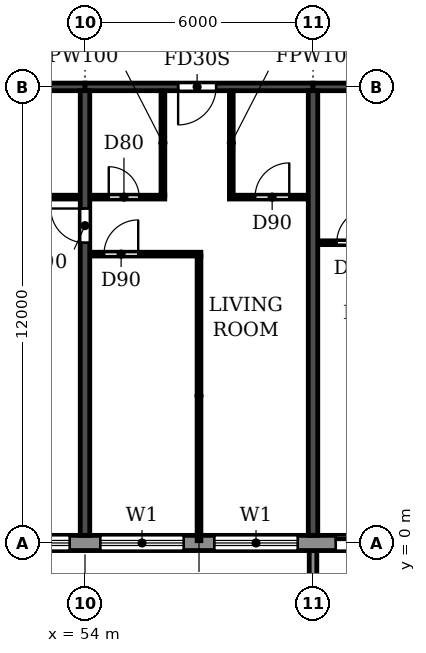
"""IFC4 building model, lengths in metres.
Left out: names, types, materials, properties, quantities, classifications, styles, units other than length and angle.
Written with IfcOpenShell. Run it as: python <this file> out.ifc"""

import sys

from ifc_helpers import new_model, si_unit, direction, frame, frame_2d, origin, place, context, subcontext, project, spatial, polyline, rectangle, outline, extrude, source, transform, mapped, element, fill, save


model = new_model("IFC4")
c1 = context("Model", 3, precision=1e-05, world=origin(), true_north=direction((0.0, 1.0)))
c2 = subcontext(c1, "Body", "Model", "MODEL_VIEW")
j1 = project(units=[si_unit("LENGTHUNIT", "METRE"), si_unit("PLANEANGLEUNIT", "RADIAN")], contexts=[c1])
p1 = place(None, origin())
s1 = spatial("IfcSite", under=j1, at=p1, CompositionType="ELEMENT")
p2 = place(p1, origin())
s2 = spatial("IfcBuilding", under=s1, at=p2, CompositionType="ELEMENT")
p3 = place(p2, frame((0.0, 0.0, 181.8)))
s3 = spatial("IfcBuildingStorey", under=s2, at=p3, CompositionType="ELEMENT", Elevation=181.8)
p4 = place(p3, frame((54.0, 0.2, 0.0), z_axis=(0.0, 0.0, 1.0), x_axis=(0.0, 1.0, 0.0)))
e1 = element("IfcWall", 1, at=p4, inside=s3, PredefinedType="SHEAR", context=c2, shape_type="SweptSolid", body=[
    extrude(rectangle(XDim=11.7, YDim=0.25, at=frame_2d((5.85, 0.0))), origin(), (0.0, 0.0, 1.0), 3.08),
])
p5 = place(p4, frame((7.7, 0.0, 0.0)))
e2 = element("IfcOpeningElement", 2, at=p5, cuts=e1, PredefinedType="OPENING", context=c2, shape_type="SweptSolid", body=[
    extrude(rectangle(XDim=0.9, YDim=2.1, at=frame_2d((0.45, 1.05))), frame((0.0, 0.135, 0.0), z_axis=(0.0, -1.0, 0.0), x_axis=(1.0, 0.0, 0.0)), (0.0, 0.0, 1.0), 0.27),
])
p6 = place(p3, frame((60.0, 0.2, 0.0), z_axis=(0.0, 0.0, 1.0), x_axis=(0.0, 1.0, 0.0)))
e3 = element("IfcWall", 3, at=p6, inside=s3, PredefinedType="SHEAR", context=c2, shape_type="SweptSolid", body=[
    extrude(rectangle(XDim=11.7, YDim=0.25, at=frame_2d((5.85, 0.0))), origin(), (0.0, 0.0, 1.0), 3.08),
])
p7 = place(p3, frame((48.0, 12.0, 0.0), z_axis=(0.0, 0.0, 1.0), x_axis=(1.0, 0.0, 0.0)))
e4 = element("IfcWall", 4, at=p7, inside=s3, PredefinedType="SHEAR", context=c2, shape_type="SweptSolid", body=[
    extrude(rectangle(XDim=6.0, YDim=0.2, at=frame_2d((3.0, 0.0))), origin(), (0.0, 0.0, 1.0), 2.48),
])
p8 = place(p3, frame((54.0, 12.0, 0.0), z_axis=(0.0, 0.0, 1.0), x_axis=(1.0, 0.0, 0.0)))
e5 = element("IfcWall", 5, at=p8, inside=s3, PredefinedType="SHEAR", context=c2, shape_type="SweptSolid", body=[
    extrude(rectangle(XDim=6.0, YDim=0.2, at=frame_2d((3.0, 0.0))), origin(), (0.0, 0.0, 1.0), 2.48),
])
p9 = place(p8, frame((2.45, 0.0, 0.0)))
e6 = element("IfcOpeningElement", 6, at=p9, cuts=e5, PredefinedType="OPENING", context=c2, shape_type="SweptSolid", body=[
    extrude(rectangle(XDim=1.0, YDim=2.1, at=frame_2d((0.5, 1.05))), frame((0.0, 0.11, 0.0), z_axis=(0.0, -1.0, 0.0), x_axis=(1.0, 0.0, 0.0)), (0.0, 0.0, 1.0), 0.22),
])
p10 = place(p3, frame((60.0, 12.0, 0.0), z_axis=(0.0, 0.0, 1.0), x_axis=(1.0, 0.0, 0.0)))
e7 = element("IfcWall", 7, at=p10, inside=s3, PredefinedType="SHEAR", context=c2, shape_type="SweptSolid", body=[
    extrude(rectangle(XDim=6.0, YDim=0.2, at=frame_2d((3.0, 0.0))), origin(), (0.0, 0.0, 1.0), 2.48),
])
p11 = place(p10, frame((2.55, 0.0, 0.0)))
e8 = element("IfcOpeningElement", 8, at=p11, cuts=e7, PredefinedType="OPENING", context=c2, shape_type="SweptSolid", body=[
    extrude(rectangle(XDim=1.0, YDim=2.1, at=frame_2d((0.5, 1.05))), frame((0.0, 0.11, 0.0), z_axis=(0.0, -1.0, 0.0), x_axis=(1.0, 0.0, 0.0)), (0.0, 0.0, 1.0), 0.22),
])
p12 = place(p3, frame((22.683, 0.0, 0.0), z_axis=(0.0, 0.0, 1.0), x_axis=(1.0, 0.0, 0.0)))
e9 = element("IfcWall", 9, at=p12, inside=s3, PredefinedType="STANDARD", context=c2, shape_type="SweptSolid", body=[
    extrude(rectangle(XDim=56.634, YDim=0.4, at=frame_2d((28.317, 0.0))), origin(), (0.0, 0.0, 1.0), 3.08),
])
p13 = place(p12, frame((1.717, 0.0, 0.9)))
e10 = element("IfcOpeningElement", 10, at=p13, cuts=e9, PredefinedType="OPENING", context=c2, shape_type="SweptSolid", body=[
    extrude(rectangle(XDim=2.2, YDim=1.5, at=frame_2d((1.1, 0.75))), frame((0.0, 0.21, 0.0), z_axis=(0.0, -1.0, 0.0), x_axis=(1.0, 0.0, 0.0)), (0.0, 0.0, 1.0), 0.42),
])
p14 = place(p12, frame((4.917, 0.0, 0.0)))
e11 = element("IfcOpeningElement", 11, at=p14, cuts=e9, PredefinedType="OPENING", context=c2, shape_type="SweptSolid", body=[
    extrude(rectangle(XDim=1.8, YDim=2.4, at=frame_2d((0.9, 1.2))), frame((0.0, 0.21, 0.0), z_axis=(0.0, -1.0, 0.0), x_axis=(1.0, 0.0, 0.0)), (0.0, 0.0, 1.0), 0.42),
])
p15 = place(p12, frame((7.717, 0.0, 0.9)))
e12 = element("IfcOpeningElement", 12, at=p15, cuts=e9, PredefinedType="OPENING", context=c2, shape_type="SweptSolid", body=[
    extrude(rectangle(XDim=2.2, YDim=1.5, at=frame_2d((1.1, 0.75))), frame((0.0, 0.21, 0.0), z_axis=(0.0, -1.0, 0.0), x_axis=(1.0, 0.0, 0.0)), (0.0, 0.0, 1.0), 0.42),
])
p16 = place(p12, frame((10.717, 0.0, 0.9)))
e13 = element("IfcOpeningElement", 13, at=p16, cuts=e9, PredefinedType="OPENING", context=c2, shape_type="SweptSolid", body=[
    extrude(rectangle(XDim=2.2, YDim=1.5, at=frame_2d((1.1, 0.75))), frame((0.0, 0.21, 0.0), z_axis=(0.0, -1.0, 0.0), x_axis=(1.0, 0.0, 0.0)), (0.0, 0.0, 1.0), 0.42),
])
p17 = place(p12, frame((13.717, 0.0, 0.9)))
e14 = element("IfcOpeningElement", 14, at=p17, cuts=e9, PredefinedType="OPENING", context=c2, shape_type="SweptSolid", body=[
    extrude(rectangle(XDim=2.2, YDim=1.5, at=frame_2d((1.1, 0.75))), frame((0.0, 0.21, 0.0), z_axis=(0.0, -1.0, 0.0), x_axis=(1.0, 0.0, 0.0)), (0.0, 0.0, 1.0), 0.42),
])
p18 = place(p12, frame((16.717, 0.0, 0.9)))
e15 = element("IfcOpeningElement", 15, at=p18, cuts=e9, PredefinedType="OPENING", context=c2, shape_type="SweptSolid", body=[
    extrude(rectangle(XDim=2.2, YDim=1.5, at=frame_2d((1.1, 0.75))), frame((0.0, 0.21, 0.0), z_axis=(0.0, -1.0, 0.0), x_axis=(1.0, 0.0, 0.0)), (0.0, 0.0, 1.0), 0.42),
])
p19 = place(p12, frame((19.717, 0.0, 0.9)))
e16 = element("IfcOpeningElement", 16, at=p19, cuts=e9, PredefinedType="OPENING", context=c2, shape_type="SweptSolid", body=[
    extrude(rectangle(XDim=2.2, YDim=1.5, at=frame_2d((1.1, 0.75))), frame((0.0, 0.21, 0.0), z_axis=(0.0, -1.0, 0.0), x_axis=(1.0, 0.0, 0.0)), (0.0, 0.0, 1.0), 0.42),
])
p20 = place(p12, frame((22.717, 0.0, 0.9)))
e17 = element("IfcOpeningElement", 17, at=p20, cuts=e9, PredefinedType="OPENING", context=c2, shape_type="SweptSolid", body=[
    extrude(rectangle(XDim=2.2, YDim=1.5, at=frame_2d((1.1, 0.75))), frame((0.0, 0.21, 0.0), z_axis=(0.0, -1.0, 0.0), x_axis=(1.0, 0.0, 0.0)), (0.0, 0.0, 1.0), 0.42),
])
p21 = place(p12, frame((25.717, 0.0, 0.9)))
e18 = element("IfcOpeningElement", 18, at=p21, cuts=e9, PredefinedType="OPENING", context=c2, shape_type="SweptSolid", body=[
    extrude(rectangle(XDim=2.2, YDim=1.5, at=frame_2d((1.1, 0.75))), frame((0.0, 0.21, 0.0), z_axis=(0.0, -1.0, 0.0), x_axis=(1.0, 0.0, 0.0)), (0.0, 0.0, 1.0), 0.42),
])
p22 = place(p12, frame((28.717, 0.0, 0.9)))
e19 = element("IfcOpeningElement", 19, at=p22, cuts=e9, PredefinedType="OPENING", context=c2, shape_type="SweptSolid", body=[
    extrude(rectangle(XDim=2.2, YDim=1.5, at=frame_2d((1.1, 0.75))), frame((0.0, 0.21, 0.0), z_axis=(0.0, -1.0, 0.0), x_axis=(1.0, 0.0, 0.0)), (0.0, 0.0, 1.0), 0.42),
])
p23 = place(p12, frame((31.717, 0.0, 0.9)))
e20 = element("IfcOpeningElement", 20, at=p23, cuts=e9, PredefinedType="OPENING", context=c2, shape_type="SweptSolid", body=[
    extrude(rectangle(XDim=2.2, YDim=1.5, at=frame_2d((1.1, 0.75))), frame((0.0, 0.21, 0.0), z_axis=(0.0, -1.0, 0.0), x_axis=(1.0, 0.0, 0.0)), (0.0, 0.0, 1.0), 0.42),
])
p24 = place(p12, frame((34.717, 0.0, 0.9)))
e21 = element("IfcOpeningElement", 21, at=p24, cuts=e9, PredefinedType="OPENING", context=c2, shape_type="SweptSolid", body=[
    extrude(rectangle(XDim=2.2, YDim=1.5, at=frame_2d((1.1, 0.75))), frame((0.0, 0.21, 0.0), z_axis=(0.0, -1.0, 0.0), x_axis=(1.0, 0.0, 0.0)), (0.0, 0.0, 1.0), 0.42),
])
p25 = place(p12, frame((37.917, 0.0, 0.0)))
e22 = element("IfcOpeningElement", 22, at=p25, cuts=e9, PredefinedType="OPENING", context=c2, shape_type="SweptSolid", body=[
    extrude(rectangle(XDim=1.8, YDim=2.4, at=frame_2d((0.9, 1.2))), frame((0.0, 0.21, 0.0), z_axis=(0.0, -1.0, 0.0), x_axis=(1.0, 0.0, 0.0)), (0.0, 0.0, 1.0), 0.42),
])
p26 = place(p12, frame((40.717, 0.0, 0.9)))
e23 = element("IfcOpeningElement", 23, at=p26, cuts=e9, PredefinedType="OPENING", context=c2, shape_type="SweptSolid", body=[
    extrude(rectangle(XDim=2.2, YDim=1.5, at=frame_2d((1.1, 0.75))), frame((0.0, 0.21, 0.0), z_axis=(0.0, -1.0, 0.0), x_axis=(1.0, 0.0, 0.0)), (0.0, 0.0, 1.0), 0.42),
])
p27 = place(p12, frame((43.717, 0.0, 0.9)))
e24 = element("IfcOpeningElement", 24, at=p27, cuts=e9, PredefinedType="OPENING", context=c2, shape_type="SweptSolid", body=[
    extrude(rectangle(XDim=2.2, YDim=1.5, at=frame_2d((1.1, 0.75))), frame((0.0, 0.21, 0.0), z_axis=(0.0, -1.0, 0.0), x_axis=(1.0, 0.0, 0.0)), (0.0, 0.0, 1.0), 0.42),
])
p28 = place(p12, frame((46.717, 0.0, 0.9)))
e25 = element("IfcOpeningElement", 25, at=p28, cuts=e9, PredefinedType="OPENING", context=c2, shape_type="SweptSolid", body=[
    extrude(rectangle(XDim=2.2, YDim=1.5, at=frame_2d((1.1, 0.75))), frame((0.0, 0.21, 0.0), z_axis=(0.0, -1.0, 0.0), x_axis=(1.0, 0.0, 0.0)), (0.0, 0.0, 1.0), 0.42),
])
p29 = place(p12, frame((49.917, 0.0, 0.0)))
e26 = element("IfcOpeningElement", 26, at=p29, cuts=e9, PredefinedType="OPENING", context=c2, shape_type="SweptSolid", body=[
    extrude(rectangle(XDim=1.8, YDim=2.4, at=frame_2d((0.9, 1.2))), frame((0.0, 0.21, 0.0), z_axis=(0.0, -1.0, 0.0), x_axis=(1.0, 0.0, 0.0)), (0.0, 0.0, 1.0), 0.42),
])
p30 = place(p12, frame((52.717, 0.0, 0.9)))
e27 = element("IfcOpeningElement", 27, at=p30, cuts=e9, PredefinedType="OPENING", context=c2, shape_type="SweptSolid", body=[
    extrude(rectangle(XDim=2.2, YDim=1.5, at=frame_2d((1.1, 0.75))), frame((0.0, 0.21, 0.0), z_axis=(0.0, -1.0, 0.0), x_axis=(1.0, 0.0, 0.0)), (0.0, 0.0, 1.0), 0.42),
])
m1 = source(origin(), c2, "Body", "SweptSolid", [
    extrude(outline(polyline([(0.0, 0.0), (0.2, 0.0), (0.2, 1.65), (0.0, 1.65), (0.0, 0.0)])), origin(), (0.0, 0.0, 1.0), 3.1),
])
p31 = place(p3, frame((59.9, -1.85, 0.0)))
e28 = element("IfcWall", 28, at=p31, inside=s3, PredefinedType="STANDARD", context=c2, shape_type="MappedRepresentation", body=[
    mapped(m1, transform((0.0, 0.0, 0.0))),
])
p32 = place(p3, frame((54.135, 7.6, 0.0), z_axis=(0.0, 0.0, 1.0), x_axis=(1.0, 0.0, 0.0)))
e29 = element("IfcWall", 29, at=p32, inside=s3, PredefinedType="PARTITIONING", context=c2, shape_type="SweptSolid", body=[
    extrude(rectangle(XDim=2.915, YDim=0.1, at=frame_2d((1.458, 0.0))), origin(), (0.0, 0.0, 1.0), 3.08),
])
p33 = place(p32, frame((0.365, 0.0, 0.0)))
e30 = element("IfcOpeningElement", 30, at=p33, cuts=e29, PredefinedType="OPENING", context=c2, shape_type="SweptSolid", body=[
    extrude(rectangle(XDim=0.9, YDim=2.1, at=frame_2d((0.45, 1.05))), frame((0.0, 0.06, 0.0), z_axis=(0.0, -1.0, 0.0), x_axis=(1.0, 0.0, 0.0)), (0.0, 0.0, 1.0), 0.12),
])
p34 = place(p3, frame((60.135, 7.9, 0.0), z_axis=(0.0, 0.0, 1.0), x_axis=(1.0, 0.0, 0.0)))
e31 = element("IfcWall", 31, at=p34, inside=s3, PredefinedType="PARTITIONING", context=c2, shape_type="SweptSolid", body=[
    extrude(rectangle(XDim=2.065, YDim=0.1, at=frame_2d((1.032, 0.0))), origin(), (0.0, 0.0, 1.0), 3.08),
])
p35 = place(p34, frame((0.49, 0.0, 0.0)))
e32 = element("IfcOpeningElement", 32, at=p35, cuts=e31, PredefinedType="OPENING", context=c2, shape_type="SweptSolid", body=[
    extrude(rectangle(XDim=0.9, YDim=2.1, at=frame_2d((0.45, 1.05))), frame((0.0, 0.06, 0.0), z_axis=(0.0, -1.0, 0.0), x_axis=(1.0, 0.0, 0.0)), (0.0, 0.0, 1.0), 0.12),
])
p36 = place(p3, frame((51.1, 9.1, 0.0), z_axis=(0.0, 0.0, 1.0), x_axis=(1.0, 0.0, 0.0)))
e33 = element("IfcWall", 33, at=p36, inside=s3, PredefinedType="PARTITIONING", context=c2, shape_type="SweptSolid", body=[
    extrude(rectangle(XDim=2.765, YDim=0.1, at=frame_2d((1.382, 0.0))), origin(), (0.0, 0.0, 1.0), 3.08),
])
p37 = place(p36, frame((1.0, 0.0, 0.0)))
e34 = element("IfcOpeningElement", 34, at=p37, cuts=e33, PredefinedType="OPENING", context=c2, shape_type="SweptSolid", body=[
    extrude(rectangle(XDim=0.8, YDim=2.1, at=frame_2d((0.4, 1.05))), frame((0.0, 0.06, 0.0), z_axis=(0.0, -1.0, 0.0), x_axis=(1.0, 0.0, 0.0)), (0.0, 0.0, 1.0), 0.12),
])
p38 = place(p3, frame((54.135, 9.1, 0.0), z_axis=(0.0, 0.0, 1.0), x_axis=(1.0, 0.0, 0.0)))
e35 = element("IfcWall", 35, at=p38, inside=s3, PredefinedType="PARTITIONING", context=c2, shape_type="SweptSolid", body=[
    extrude(rectangle(XDim=1.965, YDim=0.1, at=frame_2d((0.982, 0.0))), origin(), (0.0, 0.0, 1.0), 3.08),
])
p39 = place(p38, frame((0.49, 0.0, 0.0)))
e36 = element("IfcOpeningElement", 36, at=p39, cuts=e35, PredefinedType="OPENING", context=c2, shape_type="SweptSolid", body=[
    extrude(rectangle(XDim=0.8, YDim=2.1, at=frame_2d((0.4, 1.05))), frame((0.0, 0.06, 0.0), z_axis=(0.0, -1.0, 0.0), x_axis=(1.0, 0.0, 0.0)), (0.0, 0.0, 1.0), 0.12),
])
p40 = place(p3, frame((57.8, 9.1, 0.0), z_axis=(0.0, 0.0, 1.0), x_axis=(1.0, 0.0, 0.0)))
e37 = element("IfcWall", 37, at=p40, inside=s3, PredefinedType="PARTITIONING", context=c2, shape_type="SweptSolid", body=[
    extrude(rectangle(XDim=2.065, YDim=0.1, at=frame_2d((1.032, 0.0))), origin(), (0.0, 0.0, 1.0), 3.08),
])
p41 = place(p40, frame((0.675, 0.0, 0.0)))
e38 = element("IfcOpeningElement", 38, at=p41, cuts=e37, PredefinedType="OPENING", context=c2, shape_type="SweptSolid", body=[
    extrude(rectangle(XDim=0.9, YDim=2.1, at=frame_2d((0.45, 1.05))), frame((0.0, 0.06, 0.0), z_axis=(0.0, -1.0, 0.0), x_axis=(1.0, 0.0, 0.0)), (0.0, 0.0, 1.0), 0.12),
])
p42 = place(p3, frame((56.05, 9.15, 0.0), z_axis=(0.0, 0.0, 1.0), x_axis=(0.0, 1.0, 0.0)))
e39 = element("IfcWall", 39, at=p42, inside=s3, PredefinedType="PARTITIONING", context=c2, shape_type="SweptSolid", body=[
    extrude(rectangle(XDim=2.74, YDim=0.1, at=frame_2d((1.37, 0.0))), origin(), (0.0, 0.0, 1.0), 3.08),
])
p43 = place(p3, frame((57.0, 0.06, 0.0), z_axis=(0.0, 0.0, 1.0), x_axis=(0.0, 1.0, 0.0)))
e40 = element("IfcWall", 40, at=p43, inside=s3, PredefinedType="PARTITIONING", context=c2, shape_type="SweptSolid", body=[
    extrude(rectangle(XDim=7.49, YDim=0.1, at=frame_2d((3.745, 0.0))), origin(), (0.0, 0.0, 1.0), 3.08),
])
p44 = place(p3, frame((57.85, 9.15, 0.0), z_axis=(0.0, 0.0, 1.0), x_axis=(0.0, 1.0, 0.0)))
e41 = element("IfcWall", 41, at=p44, inside=s3, PredefinedType="PARTITIONING", context=c2, shape_type="SweptSolid", body=[
    extrude(rectangle(XDim=2.74, YDim=0.1, at=frame_2d((1.37, 0.0))), origin(), (0.0, 0.0, 1.0), 3.08),
])
p45 = place(p22, origin())
e42 = element("IfcWindow", 42, at=p45, inside=s3, PartitioningType="DOUBLE_PANEL_HORIZONTAL", PredefinedType="WINDOW", context=c2, shape_type="SweptSolid", body=[
    extrude(rectangle(XDim=2.2, YDim=1.5, at=frame_2d((1.1, 0.75))), frame((0.0, 0.03, 0.0), z_axis=(0.0, -1.0, 0.0), x_axis=(1.0, 0.0, 0.0)), (0.0, 0.0, 1.0), 0.06),
])
fill(e19, e42)
p46 = place(p23, origin())
e43 = element("IfcWindow", 43, at=p46, inside=s3, PartitioningType="DOUBLE_PANEL_HORIZONTAL", PredefinedType="WINDOW", context=c2, shape_type="SweptSolid", body=[
    extrude(rectangle(XDim=2.2, YDim=1.5, at=frame_2d((1.1, 0.75))), frame((0.0, 0.03, 0.0), z_axis=(0.0, -1.0, 0.0), x_axis=(1.0, 0.0, 0.0)), (0.0, 0.0, 1.0), 0.06),
])
fill(e20, e43)
p47 = place(p24, origin())
e44 = element("IfcWindow", 44, at=p47, inside=s3, PartitioningType="DOUBLE_PANEL_HORIZONTAL", PredefinedType="WINDOW", context=c2, shape_type="SweptSolid", body=[
    extrude(rectangle(XDim=2.2, YDim=1.5, at=frame_2d((1.1, 0.75))), frame((0.0, 0.03, 0.0), z_axis=(0.0, -1.0, 0.0), x_axis=(1.0, 0.0, 0.0)), (0.0, 0.0, 1.0), 0.06),
])
fill(e21, e44)
p48 = place(p25, origin())
e45 = element("IfcDoor", 45, at=p48, inside=s3, OperationType="DOUBLE_DOOR_SLIDING", PredefinedType="DOOR", context=c2, shape_type="SweptSolid", body=[
    extrude(rectangle(XDim=1.8, YDim=2.4, at=frame_2d((0.9, 1.2))), frame((0.0, 0.025, 0.0), z_axis=(0.0, -1.0, 0.0), x_axis=(1.0, 0.0, 0.0)), (0.0, 0.0, 1.0), 0.05),
])
fill(e22, e45)
p49 = place(p5, origin())
e46 = element("IfcDoor", 46, at=p49, inside=s3, OperationType="SINGLE_SWING_RIGHT", PredefinedType="DOOR", context=c2, shape_type="SweptSolid", body=[
    extrude(rectangle(XDim=0.9, YDim=2.1, at=frame_2d((0.45, 1.05))), frame((0.0, 0.025, 0.0), z_axis=(0.0, -1.0, 0.0), x_axis=(1.0, 0.0, 0.0)), (0.0, 0.0, 1.0), 0.05),
])
fill(e2, e46)
p50 = place(p33, origin())
e47 = element("IfcDoor", 47, at=p50, inside=s3, OperationType="SINGLE_SWING_RIGHT", PredefinedType="DOOR", context=c2, shape_type="SweptSolid", body=[
    extrude(rectangle(XDim=0.9, YDim=2.1, at=frame_2d((0.45, 1.05))), frame((0.0, 0.025, 0.0), z_axis=(0.0, -1.0, 0.0), x_axis=(1.0, 0.0, 0.0)), (0.0, 0.0, 1.0), 0.05),
])
fill(e30, e47)
p51 = place(p39, origin())
e48 = element("IfcDoor", 48, at=p51, inside=s3, OperationType="SINGLE_SWING_LEFT", PredefinedType="DOOR", context=c2, shape_type="SweptSolid", body=[
    extrude(rectangle(XDim=0.8, YDim=2.1, at=frame_2d((0.4, 1.05))), frame((0.0, 0.025, 0.0), z_axis=(0.0, -1.0, 0.0), x_axis=(1.0, 0.0, 0.0)), (0.0, 0.0, 1.0), 0.05),
])
fill(e36, e48)
p52 = place(p9, frame((1.0, 0.0, 0.0), z_axis=(0.0, 0.0, 1.0), x_axis=(-1.0, 0.0, 0.0)))
e49 = element("IfcDoor", 49, at=p52, inside=s3, OperationType="SINGLE_SWING_RIGHT", PredefinedType="DOOR", context=c2, shape_type="SweptSolid", body=[
    extrude(rectangle(XDim=1.0, YDim=2.1, at=frame_2d((0.5, 1.05))), frame((0.0, 0.025, 0.0), z_axis=(0.0, -1.0, 0.0), x_axis=(1.0, 0.0, 0.0)), (0.0, 0.0, 1.0), 0.05),
])
fill(e6, e49)
p53 = place(p41, origin())
e50 = element("IfcDoor", 50, at=p53, inside=s3, OperationType="SINGLE_SWING_RIGHT", PredefinedType="DOOR", context=c2, shape_type="SweptSolid", body=[
    extrude(rectangle(XDim=0.9, YDim=2.1, at=frame_2d((0.45, 1.05))), frame((0.0, 0.025, 0.0), z_axis=(0.0, -1.0, 0.0), x_axis=(1.0, 0.0, 0.0)), (0.0, 0.0, 1.0), 0.05),
])
fill(e38, e50)
p54 = place(p35, origin())
e51 = element("IfcDoor", 51, at=p54, inside=s3, OperationType="SINGLE_SWING_RIGHT", PredefinedType="DOOR", context=c2, shape_type="SweptSolid", body=[
    extrude(rectangle(XDim=0.9, YDim=2.1, at=frame_2d((0.45, 1.05))), frame((0.0, 0.025, 0.0), z_axis=(0.0, -1.0, 0.0), x_axis=(1.0, 0.0, 0.0)), (0.0, 0.0, 1.0), 0.05),
])
fill(e32, e51)
save(model, sys.argv[1])
